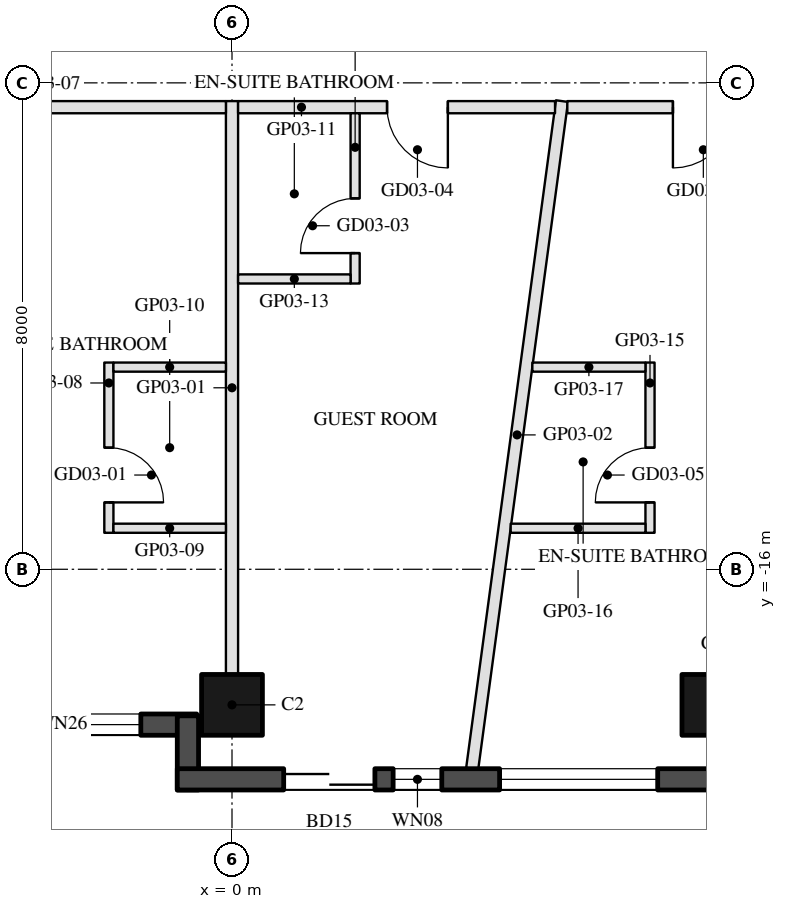
"""IFC4 building model, lengths in metres.
Left out: names, types, materials, properties, quantities, classifications, styles, units other than length and angle.
Written with IfcOpenShell. Run it as: python <this file> out.ifc"""

import sys

from ifc_helpers import new_model, si_unit, direction, frame, frame_2d, origin, origin_2d, place, context, subcontext, project, spatial, rectangle, hollow_rectangle, extrude, element, fill, save


model = new_model("IFC4")
c1 = context("Model", 3, precision=1e-05, world=origin(), true_north=direction((0.0, 1.0)))
c2 = subcontext(c1, "Body", "Model", "MODEL_VIEW")
j1 = project(units=[si_unit("LENGTHUNIT", "METRE"), si_unit("PLANEANGLEUNIT", "RADIAN")], contexts=[c1])
p1 = place(None, origin())
s1 = spatial("IfcSite", under=j1, at=p1, CompositionType="ELEMENT")
p2 = place(p1, origin())
s2 = spatial("IfcBuilding", under=s1, at=p2, CompositionType="ELEMENT")
p3 = place(p2, frame((0.0, 0.0, 65.0)))
s3 = spatial("IfcBuildingStorey", under=s2, at=p3, CompositionType="ELEMENT", Elevation=65.0)
for number, where, z_axis, x_axis in (
    (1, (0.0, -18.23, 0.0), (0.0, 0.0, 1.0), (-1.0, 0.0, 0.0)),
    (2, (7.9, -18.23, 0.0), (0.0, 0.0, 1.0), (-1.0, 0.0, 0.0)),
):
    element("IfcColumn", number, at=place(p3, frame(where, z_axis=z_axis, x_axis=x_axis)), inside=s3, PredefinedType="COLUMN", context=c2, shape_type="SweptSolid", body=[
        extrude(hollow_rectangle(XDim=1.0, YDim=1.0, WallThickness=0.045, at=origin_2d()), origin(), (0.0, 0.0, 1.0), 3.7),
    ])
p4 = place(p3, frame((-7.32, -18.555, 0.0), z_axis=(0.0, 0.0, 1.0), x_axis=(1.0, 0.0, 0.0)))
e3 = element("IfcWall", 3, at=p4, inside=s3, PredefinedType="SOLIDWALL", context=c2, shape_type="SweptSolid", body=[
    extrude(rectangle(XDim=6.74, YDim=0.35, at=frame_2d((3.37, 0.0))), origin(), (0.0, 0.0, 1.0), 3.55),
])
p5 = place(p4, frame((0.32, 0.0, 0.3)))
e4 = element("IfcOpeningElement", 4, at=p5, cuts=e3, PredefinedType="OPENING", context=c2, shape_type="SweptSolid", body=[
    extrude(rectangle(XDim=2.6, YDim=2.65, at=frame_2d((1.3, 1.325))), frame((0.0, 0.185, 0.0), z_axis=(0.0, -1.0, 0.0), x_axis=(1.0, 0.0, 0.0)), (0.0, 0.0, 1.0), 0.37),
])
p6 = place(p4, frame((3.22, 0.0, 0.3)))
e5 = element("IfcOpeningElement", 5, at=p6, cuts=e3, PredefinedType="OPENING", context=c2, shape_type="SweptSolid", body=[
    extrude(rectangle(XDim=2.6, YDim=2.65, at=frame_2d((1.3, 1.325))), frame((0.0, 0.185, 0.0), z_axis=(0.0, -1.0, 0.0), x_axis=(1.0, 0.0, 0.0)), (0.0, 0.0, 1.0), 0.37),
])
p7 = place(p3, frame((-0.725, -18.41, 0.0), z_axis=(0.0, 0.0, 1.0), x_axis=(0.0, -1.0, 0.0)))
e6 = element("IfcWall", 6, at=p7, inside=s3, PredefinedType="SOLIDWALL", context=c2, shape_type="SweptSolid", body=[
    extrude(rectangle(XDim=1.22, YDim=0.35, at=frame_2d((0.61, 0.0))), origin(), (0.0, 0.0, 1.0), 3.55),
])
p8 = place(p3, frame((-0.9, -19.455, 0.0), z_axis=(0.0, 0.0, 1.0), x_axis=(1.0, 0.0, 0.0)))
e7 = element("IfcWall", 7, at=p8, inside=s3, PredefinedType="SOLIDWALL", context=c2, shape_type="SweptSolid", body=[
    extrude(rectangle(XDim=9.7, YDim=0.35, at=frame_2d((4.85, 0.0))), origin(), (0.0, 0.0, 1.0), 3.55),
])
p9 = place(p8, frame((1.75, 0.0, 0.0)))
e8 = element("IfcOpeningElement", 8, at=p9, cuts=e7, PredefinedType="OPENING", context=c2, shape_type="SweptSolid", body=[
    extrude(rectangle(XDim=1.5, YDim=2.4, at=frame_2d((0.75, 1.2))), frame((0.0, 0.185, 0.0), z_axis=(0.0, -1.0, 0.0), x_axis=(1.0, 0.0, 0.0)), (0.0, 0.0, 1.0), 0.37),
])
p10 = place(p8, frame((3.55, 0.0, 0.3)))
e9 = element("IfcOpeningElement", 9, at=p10, cuts=e7, PredefinedType="OPENING", context=c2, shape_type="SweptSolid", body=[
    extrude(rectangle(XDim=0.8, YDim=2.65, at=frame_2d((0.4, 1.325))), frame((0.0, 0.185, 0.0), z_axis=(0.0, -1.0, 0.0), x_axis=(1.0, 0.0, 0.0)), (0.0, 0.0, 1.0), 0.37),
])
p11 = place(p8, frame((5.301, 0.0, 0.3)))
e10 = element("IfcOpeningElement", 10, at=p11, cuts=e7, PredefinedType="OPENING", context=c2, shape_type="SweptSolid", body=[
    extrude(rectangle(XDim=2.6, YDim=2.65, at=frame_2d((1.3, 1.325))), frame((0.0, 0.185, 0.0), z_axis=(0.0, -1.0, 0.0), x_axis=(1.0, 0.0, 0.0)), (0.0, 0.0, 1.0), 0.37),
])
p12 = place(p3, frame((0.0, -17.73, 0.0), z_axis=(0.0, 0.0, 1.0), x_axis=(0.0, 1.0, 0.0)))
e11 = element("IfcWall", 11, at=p12, inside=s3, PredefinedType="PARTITIONING", context=c2, shape_type="SweptSolid", body=[
    extrude(rectangle(XDim=9.43, YDim=0.2, at=frame_2d((4.715, 0.0))), origin(), (0.0, 0.0, 1.0), 2.95),
])
p13 = place(p3, frame((3.95, -19.28, 0.0), z_axis=(0.0, 0.0, 1.0), x_axis=(0.133321271807, 0.991072872439, 0.0)))
e12 = element("IfcWall", 12, at=p13, inside=s3, PredefinedType="PARTITIONING", context=c2, shape_type="SweptSolid", body=[
    extrude(rectangle(XDim=11.079, YDim=0.2, at=frame_2d((5.54, 0.0))), origin(), (0.0, 0.0, 1.0), 2.95),
])
p14 = place(p3, frame((-0.1, -8.4, 0.0), z_axis=(0.0, 0.0, 1.0), x_axis=(-1.0, 0.0, 0.0)))
e13 = element("IfcWall", 13, at=p14, inside=s3, PredefinedType="PARTITIONING", context=c2, shape_type="SweptSolid", body=[
    extrude(rectangle(XDim=9.888, YDim=0.2, at=frame_2d((4.944, 0.0))), origin(), (0.0, 0.0, 1.0), 2.95),
])
p15 = place(p14, frame((4.444, 0.0, 0.0)))
e14 = element("IfcOpeningElement", 14, at=p15, cuts=e13, PredefinedType="OPENING", context=c2, shape_type="SweptSolid", body=[
    extrude(rectangle(XDim=1.0, YDim=2.1, at=frame_2d((0.5, 1.05))), frame((0.0, 0.11, 0.0), z_axis=(0.0, -1.0, 0.0), x_axis=(1.0, 0.0, 0.0)), (0.0, 0.0, 1.0), 0.22),
])
p16 = place(p3, frame((-2.025, -12.6, 0.0), z_axis=(0.0, 0.0, 1.0), x_axis=(0.0, -1.0, 0.0)))
e15 = element("IfcWall", 15, at=p16, inside=s3, PredefinedType="PARTITIONING", context=c2, shape_type="SweptSolid", body=[
    extrude(rectangle(XDim=2.8, YDim=0.15, at=frame_2d((1.4, 0.0))), origin(), (0.0, 0.0, 1.0), 3.55),
])
p17 = place(p16, frame((1.4, 0.0, 0.0)))
e16 = element("IfcOpeningElement", 16, at=p17, cuts=e15, PredefinedType="OPENING", context=c2, shape_type="SweptSolid", body=[
    extrude(rectangle(XDim=0.9, YDim=2.1, at=frame_2d((0.45, 1.05))), frame((0.0, 0.085, 0.0), z_axis=(0.0, -1.0, 0.0), x_axis=(1.0, 0.0, 0.0)), (0.0, 0.0, 1.0), 0.17),
])
for number, where, z_axis, x_axis in (
    (17, (-1.95, -15.325, 0.0), (0.0, 0.0, 1.0), (1.0, 0.0, 0.0)),
    (18, (-1.95, -12.675, 0.0), (0.0, 0.0, 1.0), (1.0, 0.0, 0.0)),
):
    element("IfcWall", number, at=place(p3, frame(where, z_axis=z_axis, x_axis=x_axis)), inside=s3, PredefinedType="PARTITIONING", context=c2, shape_type="SweptSolid", body=[
        extrude(rectangle(XDim=1.85, YDim=0.15, at=frame_2d((0.925, 0.0))), origin(), (0.0, 0.0, 1.0), 2.95),
    ])
p18 = place(p3, frame((5.312, -8.4, 0.0), z_axis=(0.0, 0.0, 1.0), x_axis=(-1.0, 0.0, 0.0)))
e19 = element("IfcWall", 19, at=p18, inside=s3, PredefinedType="PARTITIONING", context=c2, shape_type="SweptSolid", body=[
    extrude(rectangle(XDim=5.212, YDim=0.2, at=frame_2d((2.606, 0.0))), origin(), (0.0, 0.0, 1.0), 2.95),
])
p19 = place(p18, frame((1.763, 0.0, 0.0)))
e20 = element("IfcOpeningElement", 20, at=p19, cuts=e19, PredefinedType="OPENING", context=c2, shape_type="SweptSolid", body=[
    extrude(rectangle(XDim=1.0, YDim=2.1, at=frame_2d((0.5, 1.05))), frame((0.0, 0.11, 0.0), z_axis=(0.0, -1.0, 0.0), x_axis=(1.0, 0.0, 0.0)), (0.0, 0.0, 1.0), 0.22),
])
p20 = place(p3, frame((2.025, -11.3, 0.0), z_axis=(0.0, 0.0, 1.0), x_axis=(0.0, 1.0, 0.0)))
e21 = element("IfcWall", 21, at=p20, inside=s3, PredefinedType="PARTITIONING", context=c2, shape_type="SweptSolid", body=[
    extrude(rectangle(XDim=2.8, YDim=0.15, at=frame_2d((1.4, 0.0))), origin(), (0.0, 0.0, 1.0), 3.55),
])
p21 = place(p20, frame((0.5, 0.0, 0.0)))
e22 = element("IfcOpeningElement", 22, at=p21, cuts=e21, PredefinedType="OPENING", context=c2, shape_type="SweptSolid", body=[
    extrude(rectangle(XDim=0.9, YDim=2.1, at=frame_2d((0.45, 1.05))), frame((0.0, 0.085, 0.0), z_axis=(0.0, -1.0, 0.0), x_axis=(1.0, 0.0, 0.0)), (0.0, 0.0, 1.0), 0.17),
])
p22 = place(p3, frame((0.1, -11.225, 0.0), z_axis=(0.0, 0.0, 1.0), x_axis=(1.0, 0.0, 0.0)))
e23 = element("IfcWall", 23, at=p22, inside=s3, PredefinedType="PARTITIONING", context=c2, shape_type="SweptSolid", body=[
    extrude(rectangle(XDim=1.85, YDim=0.15, at=frame_2d((0.925, 0.0))), origin(), (0.0, 0.0, 1.0), 2.95),
])
p23 = place(p3, frame((9.988, -8.4, 0.0), z_axis=(0.0, 0.0, 1.0), x_axis=(-1.0, 0.0, 0.0)))
e24 = element("IfcWall", 24, at=p23, inside=s3, PredefinedType="PARTITIONING", context=c2, shape_type="SweptSolid", body=[
    extrude(rectangle(XDim=4.474, YDim=0.2, at=frame_2d((2.237, 0.0))), origin(), (0.0, 0.0, 1.0), 2.95),
])
p24 = place(p23, frame((1.737, 0.0, 0.0)))
e25 = element("IfcOpeningElement", 25, at=p24, cuts=e24, PredefinedType="OPENING", context=c2, shape_type="SweptSolid", body=[
    extrude(rectangle(XDim=1.0, YDim=2.1, at=frame_2d((0.5, 1.05))), frame((0.0, 0.11, 0.0), z_axis=(0.0, -1.0, 0.0), x_axis=(1.0, 0.0, 0.0)), (0.0, 0.0, 1.0), 0.22),
])
p25 = place(p3, frame((6.875, -15.4, 0.0), z_axis=(0.0, 0.0, 1.0), x_axis=(0.0, 1.0, 0.0)))
e26 = element("IfcWall", 26, at=p25, inside=s3, PredefinedType="PARTITIONING", context=c2, shape_type="SweptSolid", body=[
    extrude(rectangle(XDim=2.8, YDim=0.15, at=frame_2d((1.4, 0.0))), origin(), (0.0, 0.0, 1.0), 3.55),
])
p26 = place(p25, frame((0.5, 0.0, 0.0)))
e27 = element("IfcOpeningElement", 27, at=p26, cuts=e26, PredefinedType="OPENING", context=c2, shape_type="SweptSolid", body=[
    extrude(rectangle(XDim=0.9, YDim=2.1, at=frame_2d((0.45, 1.05))), frame((0.0, 0.085, 0.0), z_axis=(0.0, -1.0, 0.0), x_axis=(1.0, 0.0, 0.0)), (0.0, 0.0, 1.0), 0.17),
])
p27 = place(p3, frame((4.583, -15.325, 0.0), z_axis=(0.0, 0.0, 1.0), x_axis=(1.0, 0.0, 0.0)))
e28 = element("IfcWall", 28, at=p27, inside=s3, PredefinedType="PARTITIONING", context=c2, shape_type="SweptSolid", body=[
    extrude(rectangle(XDim=2.216, YDim=0.15, at=frame_2d((1.108, 0.0))), origin(), (0.0, 0.0, 1.0), 3.55),
])
p28 = place(p3, frame((4.939, -12.675, 0.0), z_axis=(0.0, 0.0, 1.0), x_axis=(1.0, 0.0, 0.0)))
e29 = element("IfcWall", 29, at=p28, inside=s3, PredefinedType="PARTITIONING", context=c2, shape_type="SweptSolid", body=[
    extrude(rectangle(XDim=1.86, YDim=0.15, at=frame_2d((0.93, 0.0))), origin(), (0.0, 0.0, 1.0), 3.55),
])
p29 = place(p6, origin())
e30 = element("IfcWindow", 30, at=p29, inside=s3, PartitioningType="SINGLE_PANEL", PredefinedType="WINDOW", context=c2, shape_type="SweptSolid", body=[
    extrude(rectangle(XDim=2.6, YDim=2.65, at=frame_2d((1.3, 1.325))), frame((0.0, 0.03, 0.0), z_axis=(0.0, -1.0, 0.0), x_axis=(1.0, 0.0, 0.0)), (0.0, 0.0, 1.0), 0.06),
])
fill(e5, e30)
p30 = place(p9, frame((1.5, 0.0, 0.0), z_axis=(0.0, 0.0, 1.0), x_axis=(-1.0, 0.0, 0.0)))
e31 = element("IfcDoor", 31, at=p30, inside=s3, OperationType="SLIDING_TO_LEFT", PredefinedType="DOOR", context=c2, shape_type="SweptSolid", body=[
    extrude(rectangle(XDim=1.5, YDim=2.4, at=frame_2d((0.75, 1.2))), frame((0.0, 0.025, 0.0), z_axis=(0.0, -1.0, 0.0), x_axis=(1.0, 0.0, 0.0)), (0.0, 0.0, 1.0), 0.05),
])
fill(e8, e31)
p31 = place(p10, origin())
e32 = element("IfcWindow", 32, at=p31, inside=s3, PartitioningType="SINGLE_PANEL", PredefinedType="WINDOW", context=c2, shape_type="SweptSolid", body=[
    extrude(rectangle(XDim=0.8, YDim=2.65, at=frame_2d((0.4, 1.325))), frame((0.0, 0.03, 0.0), z_axis=(0.0, -1.0, 0.0), x_axis=(1.0, 0.0, 0.0)), (0.0, 0.0, 1.0), 0.06),
])
fill(e9, e32)
p32 = place(p11, origin())
e33 = element("IfcWindow", 33, at=p32, inside=s3, PartitioningType="SINGLE_PANEL", PredefinedType="WINDOW", context=c2, shape_type="SweptSolid", body=[
    extrude(rectangle(XDim=2.6, YDim=2.65, at=frame_2d((1.3, 1.325))), frame((0.0, 0.03, 0.0), z_axis=(0.0, -1.0, 0.0), x_axis=(1.0, 0.0, 0.0)), (0.0, 0.0, 1.0), 0.06),
])
fill(e10, e33)
p33 = place(p17, origin())
e34 = element("IfcDoor", 34, at=p33, inside=s3, OperationType="SINGLE_SWING_RIGHT", PredefinedType="DOOR", context=c2, shape_type="SweptSolid", body=[
    extrude(rectangle(XDim=0.9, YDim=2.1, at=frame_2d((0.45, 1.05))), frame((0.0, 0.025, 0.0), z_axis=(0.0, -1.0, 0.0), x_axis=(1.0, 0.0, 0.0)), (0.0, 0.0, 1.0), 0.05),
])
fill(e16, e34)
p34 = place(p21, origin())
e35 = element("IfcDoor", 35, at=p34, inside=s3, OperationType="SINGLE_SWING_LEFT", PredefinedType="DOOR", context=c2, shape_type="SweptSolid", body=[
    extrude(rectangle(XDim=0.9, YDim=2.1, at=frame_2d((0.45, 1.05))), frame((0.0, 0.025, 0.0), z_axis=(0.0, -1.0, 0.0), x_axis=(1.0, 0.0, 0.0)), (0.0, 0.0, 1.0), 0.05),
])
fill(e22, e35)
p35 = place(p19, origin())
e36 = element("IfcDoor", 36, at=p35, inside=s3, OperationType="SINGLE_SWING_LEFT", PredefinedType="DOOR", context=c2, shape_type="SweptSolid", body=[
    extrude(rectangle(XDim=1.0, YDim=2.1, at=frame_2d((0.5, 1.05))), frame((0.0, 0.025, 0.0), z_axis=(0.0, -1.0, 0.0), x_axis=(1.0, 0.0, 0.0)), (0.0, 0.0, 1.0), 0.05),
])
fill(e20, e36)
p36 = place(p26, origin())
e37 = element("IfcDoor", 37, at=p36, inside=s3, OperationType="SINGLE_SWING_LEFT", PredefinedType="DOOR", context=c2, shape_type="SweptSolid", body=[
    extrude(rectangle(XDim=0.9, YDim=2.1, at=frame_2d((0.45, 1.05))), frame((0.0, 0.025, 0.0), z_axis=(0.0, -1.0, 0.0), x_axis=(1.0, 0.0, 0.0)), (0.0, 0.0, 1.0), 0.05),
])
fill(e27, e37)
p37 = place(p24, origin())
e38 = element("IfcDoor", 38, at=p37, inside=s3, OperationType="SINGLE_SWING_RIGHT", PredefinedType="DOOR", context=c2, shape_type="SweptSolid", body=[
    extrude(rectangle(XDim=1.0, YDim=2.1, at=frame_2d((0.5, 1.05))), frame((0.0, 0.025, 0.0), z_axis=(0.0, -1.0, 0.0), x_axis=(1.0, 0.0, 0.0)), (0.0, 0.0, 1.0), 0.05),
])
fill(e25, e38)
save(model, sys.argv[1])
